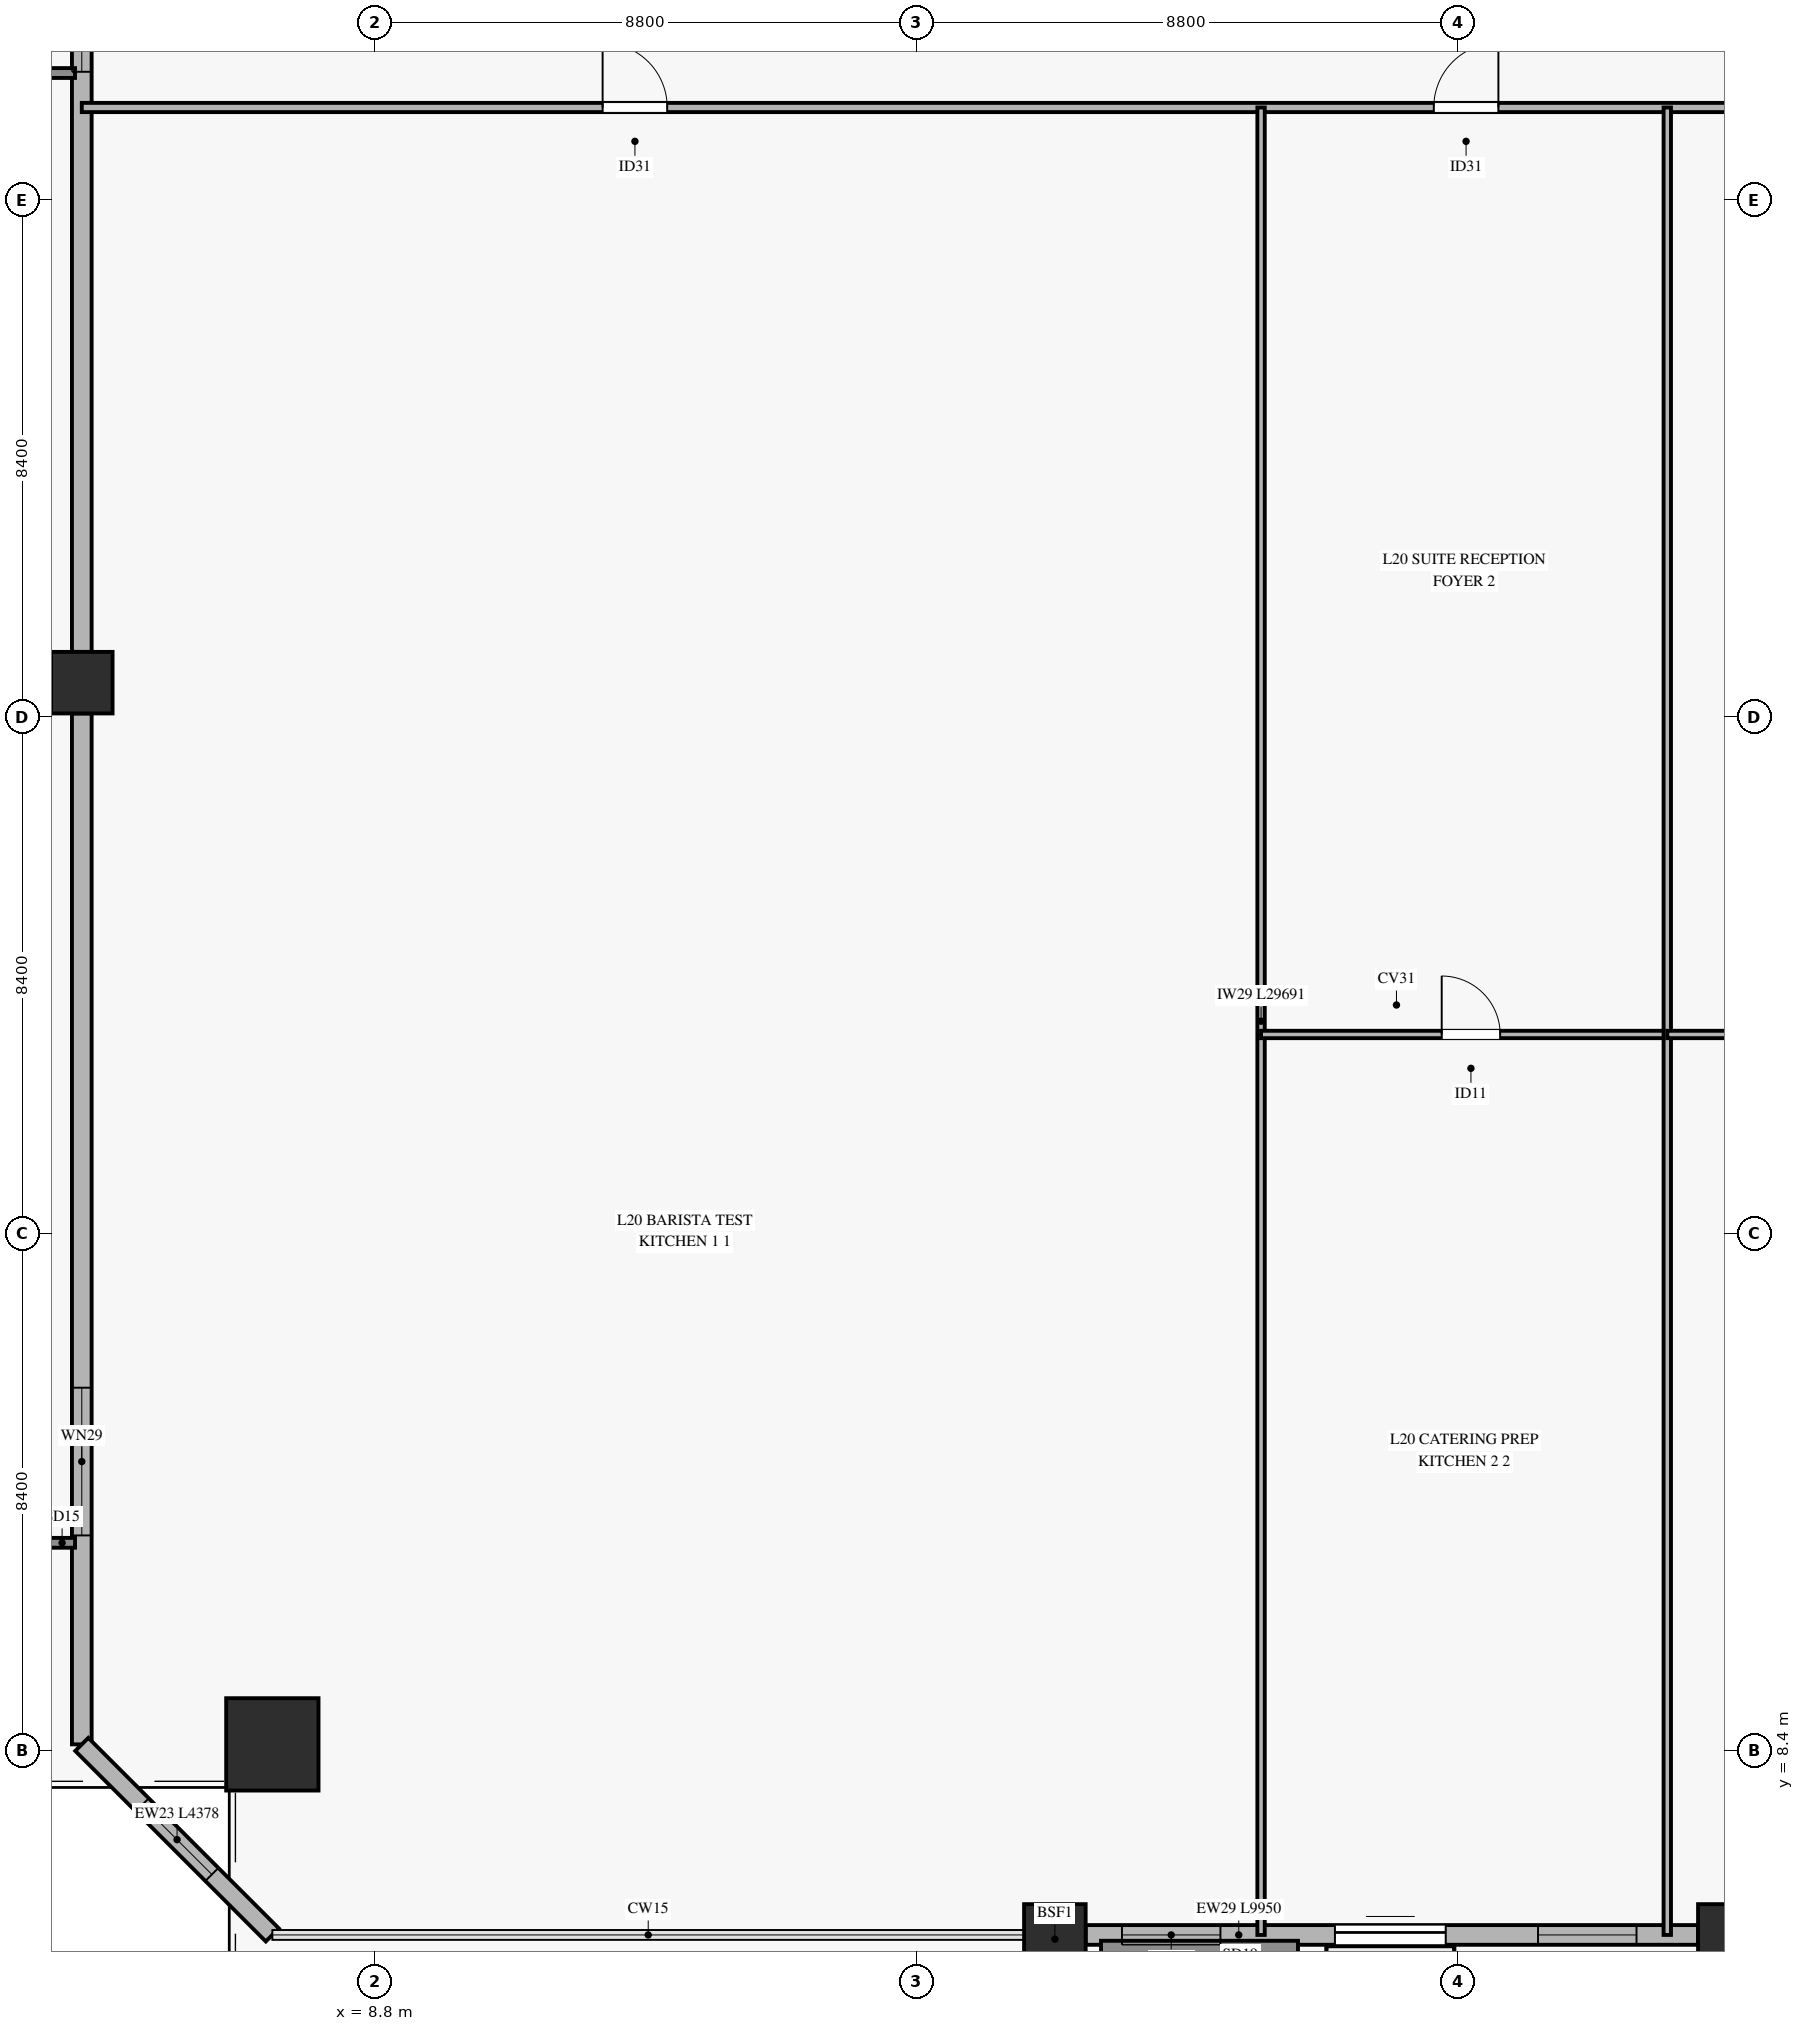
"""IFC4 building model, lengths in metres.
Left out: names, types, materials, properties, quantities, classifications, styles, units other than length and angle.
Written with IfcOpenShell. Run it as: python <this file> out.ifc"""

import sys

from ifc_helpers import new_model, si_unit, direction, frame, frame_2d, origin, origin_2d, place, context, subcontext, project, spatial, rectangle, hollow_rectangle, extrude, source, transform, mapped, element, fill, save


model = new_model("IFC4")
c1 = context("Model", 3, precision=1e-05, world=origin(), true_north=direction((0.0, 1.0)))
c2 = subcontext(c1, "Body", "Model", "MODEL_VIEW")
j1 = project(units=[si_unit("LENGTHUNIT", "METRE"), si_unit("PLANEANGLEUNIT", "RADIAN")], contexts=[c1])
p1 = place(None, origin())
s1 = spatial("IfcSite", under=j1, at=p1, CompositionType="ELEMENT")
p2 = place(p1, origin())
s2 = spatial("IfcBuilding", under=s1, at=p2, CompositionType="ELEMENT")
p3 = place(p2, frame((0.0, 0.0, 83.5)))
s3 = spatial("IfcBuildingStorey", under=s2, at=p3, CompositionType="ELEMENT", Elevation=83.5)
m1 = source(origin(), c2, "Body", "SweptSolid", [
    extrude(hollow_rectangle(XDim=1.5, YDim=1.5, WallThickness=0.07, at=origin_2d()), origin(), (0.0, 0.0, 1.0), 3.72),
])
p4 = place(p3, frame((7.136, 8.505, 0.0), z_axis=(0.056181856516, 0.134744569424, 0.989286358952), x_axis=(-0.922983788144, 0.38483883227, 0.0)))
e1 = element("IfcColumn", 1, at=p4, inside=s3, PredefinedType="COLUMN", context=c2, shape_type="MappedRepresentation", body=[
    mapped(m1, transform((0.0, 0.0, 0.0), x_axis=(1.0, 0.0, 0.0), y_axis=(0.0, 1.0, 0.0), z_axis=(0.0, 0.0, 1.0), scale=1.0)),
])
m2 = source(origin(), c2, "Body", "SweptSolid", [
    extrude(hollow_rectangle(XDim=1.0, YDim=1.0, WallThickness=0.045, at=origin_2d()), origin(), (0.0, 0.0, 1.0), 3.718),
])
for number, where, z_axis, x_axis in (
    (2, (19.85, 5.409, 0.0), (0.0, 0.142, 0.99), (-1.0, 0.0, 0.0)),
    (3, (30.8, 5.409, 0.0), (0.0, 0.142, 0.99), (-1.0, 0.0, 0.0)),
):
    element("IfcColumn", number, at=place(p3, frame(where, z_axis=z_axis, x_axis=x_axis)), inside=s3, PredefinedType="COLUMN", context=c2, shape_type="MappedRepresentation", body=[
        mapped(m2, transform((0.0, 0.0, 0.0), x_axis=(1.0, 0.0, 0.0), y_axis=(0.0, 1.0, 0.0), z_axis=(0.0, 0.0, 1.0), scale=1.0)),
    ])
m3 = source(origin(), c2, "Body", "SweptSolid", [
    extrude(hollow_rectangle(XDim=1.0, YDim=1.0, WallThickness=0.045, at=origin_2d()), origin(), (0.0, 0.0, 1.0), 3.697),
])
p5 = place(p3, frame((4.04, 25.755, 0.0), z_axis=(0.06353152493, 0.07119229093, 0.995437292376), x_axis=(-0.74610956251, 0.665823190292, 0.0)))
e4 = element("IfcColumn", 4, at=p5, inside=s3, PredefinedType="COLUMN", context=c2, shape_type="MappedRepresentation", body=[
    mapped(m3, transform((0.0, 0.0, 0.0), x_axis=(1.0, 0.0, 0.0), y_axis=(0.0, 1.0, 0.0), z_axis=(0.0, 0.0, 1.0), scale=1.0)),
])
p6 = place(p3, frame((20.35, 5.409, 0.0), z_axis=(0.0, 0.0, 1.0), x_axis=(1.0, 0.0, 0.0)))
e5 = element("IfcWall", 5, at=p6, inside=s3, PredefinedType="SOLIDWALL", context=c2, shape_type="SweptSolid", body=[
    extrude(rectangle(XDim=9.95, YDim=0.32, at=frame_2d((4.975, 0.0))), origin(), (0.0, 0.0, 1.0), 3.16),
])
p7 = place(p6, frame((4.05, 0.0, 0.0)))
e6 = element("IfcOpeningElement", 6, at=p7, cuts=e5, PredefinedType="OPENING", context=c2, shape_type="SweptSolid", body=[
    extrude(rectangle(XDim=1.8, YDim=2.25, at=frame_2d((0.9, 1.125))), frame((0.0, 0.17, 0.0), z_axis=(0.0, -1.0, 0.0), x_axis=(1.0, 0.0, 0.0)), (0.0, 0.0, 1.0), 0.34),
])
p8 = place(p6, frame((0.59, 0.0, 0.45)))
e7 = element("IfcOpeningElement", 7, at=p8, cuts=e5, PredefinedType="OPENING", context=c2, shape_type="SweptSolid", body=[
    extrude(rectangle(XDim=1.6, YDim=2.0, at=frame_2d((0.8, 1.0))), frame((0.0, 0.17, 0.0), z_axis=(0.0, -1.0, 0.0), x_axis=(1.0, 0.0, 0.0)), (0.0, 0.0, 1.0), 0.34),
])
p9 = place(p6, frame((7.35, 0.0, 0.45)))
e8 = element("IfcOpeningElement", 8, at=p9, cuts=e5, PredefinedType="OPENING", context=c2, shape_type="SweptSolid", body=[
    extrude(rectangle(XDim=1.6, YDim=2.0, at=frame_2d((0.8, 1.0))), frame((0.0, 0.17, 0.0), z_axis=(0.0, -1.0, 0.0), x_axis=(1.0, 0.0, 0.0)), (0.0, 0.0, 1.0), 0.34),
])
p10 = place(p3, frame((4.04, 8.505, 0.0), z_axis=(0.0, 0.0, 1.0), x_axis=(0.0, 1.0, 0.0)))
e9 = element("IfcWall", 9, at=p10, inside=s3, PredefinedType="SOLIDWALL", context=c2, shape_type="SweptSolid", body=[
    extrude(rectangle(XDim=16.75, YDim=0.32, at=frame_2d((8.375, 0.0))), origin(), (0.0, 0.0, 1.0), 3.16),
])
p11 = place(p10, frame((3.395, 0.0, 0.45)))
e10 = element("IfcOpeningElement", 10, at=p11, cuts=e9, PredefinedType="OPENING", context=c2, shape_type="SweptSolid", body=[
    extrude(rectangle(XDim=2.4, YDim=2.1, at=frame_2d((1.2, 1.05))), frame((0.0, 0.17, 0.0), z_axis=(0.0, -1.0, 0.0), x_axis=(1.0, 0.0, 0.0)), (0.0, 0.0, 1.0), 0.34),
])
p12 = place(p3, frame((4.04, 26.255, 0.0), z_axis=(0.0, 0.0, 1.0), x_axis=(0.0, 1.0, 0.0)))
e11 = element("IfcWall", 11, at=p12, inside=s3, PredefinedType="SOLIDWALL", context=c2, shape_type="SweptSolid", body=[
    extrude(rectangle(XDim=16.749, YDim=0.32, at=frame_2d((8.375, 0.0))), origin(), (0.0, 0.0, 1.0), 3.16),
])
p13 = place(p12, frame((9.425, 0.0, 0.45)))
e12 = element("IfcOpeningElement", 12, at=p13, cuts=e11, PredefinedType="OPENING", context=c2, shape_type="SweptSolid", body=[
    extrude(rectangle(XDim=1.2, YDim=2.0, at=frame_2d((0.6, 1.0))), frame((0.0, 0.17, 0.0), z_axis=(0.0, -1.0, 0.0), x_axis=(1.0, 0.0, 0.0)), (0.0, 0.0, 1.0), 0.34),
])
p14 = place(p3, frame((4.04, 8.505, 0.0), z_axis=(0.0, 0.0, 1.0), x_axis=(0.707106781187, -0.707106781187, 0.0)))
e13 = element("IfcWall", 13, at=p14, inside=s3, PredefinedType="SOLIDWALL", context=c2, shape_type="SweptSolid", body=[
    extrude(rectangle(XDim=4.378, YDim=0.3, at=frame_2d((2.189, 0.0))), origin(), (0.0, 0.0, 1.0), 3.16),
])
p15 = place(p14, frame((1.389, 0.0, 0.45)))
e14 = element("IfcOpeningElement", 14, at=p15, cuts=e13, PredefinedType="OPENING", context=c2, shape_type="SweptSolid", body=[
    extrude(rectangle(XDim=1.6, YDim=2.0, at=frame_2d((0.8, 1.0))), frame((0.0, 0.16, 0.0), z_axis=(0.0, -1.0, 0.0), x_axis=(1.0, 0.0, 0.0)), (0.0, 0.0, 1.0), 0.32),
])
p16 = place(p3, frame((4.04, 35.1, 0.0), z_axis=(0.0, 0.0, 1.0), x_axis=(1.0, 0.0, 0.0)))
e15 = element("IfcWall", 15, at=p16, inside=s3, PredefinedType="PARTITIONING", context=c2, shape_type="SweptSolid", body=[
    extrude(rectangle(XDim=62.321, YDim=0.15, at=frame_2d((31.161, 0.0))), origin(), (0.0, 0.0, 1.0), 2.765),
])
p17 = place(p16, frame((8.462, 0.0, 0.0)))
e16 = element("IfcOpeningElement", 16, at=p17, cuts=e15, PredefinedType="OPENING", context=c2, shape_type="SweptSolid", body=[
    extrude(rectangle(XDim=1.05, YDim=2.15, at=frame_2d((0.525, 1.075))), frame((0.0, 0.085, 0.0), z_axis=(0.0, -1.0, 0.0), x_axis=(1.0, 0.0, 0.0)), (0.0, 0.0, 1.0), 0.17),
])
p18 = place(p16, frame((21.966, 0.0, 0.0)))
e17 = element("IfcOpeningElement", 17, at=p18, cuts=e15, PredefinedType="OPENING", context=c2, shape_type="SweptSolid", body=[
    extrude(rectangle(XDim=1.05, YDim=2.15, at=frame_2d((0.525, 1.075))), frame((0.0, 0.085, 0.0), z_axis=(0.0, -1.0, 0.0), x_axis=(1.0, 0.0, 0.0)), (0.0, 0.0, 1.0), 0.17),
])
p19 = place(p16, frame((28.646, 0.0, 0.0)))
e18 = element("IfcOpeningElement", 18, at=p19, cuts=e15, PredefinedType="OPENING", context=c2, shape_type="SweptSolid", body=[
    extrude(rectangle(XDim=1.05, YDim=2.15, at=frame_2d((0.525, 1.075))), frame((0.0, 0.085, 0.0), z_axis=(0.0, -1.0, 0.0), x_axis=(1.0, 0.0, 0.0)), (0.0, 0.0, 1.0), 0.17),
])
p20 = place(p16, frame((35.606, 0.0, 0.0)))
e19 = element("IfcOpeningElement", 19, at=p20, cuts=e15, PredefinedType="OPENING", context=c2, shape_type="SweptSolid", body=[
    extrude(rectangle(XDim=1.05, YDim=2.15, at=frame_2d((0.525, 1.075))), frame((0.0, 0.085, 0.0), z_axis=(0.0, -1.0, 0.0), x_axis=(1.0, 0.0, 0.0)), (0.0, 0.0, 1.0), 0.17),
])
p21 = place(p16, frame((49.216, 0.0, 0.0)))
e20 = element("IfcOpeningElement", 20, at=p21, cuts=e15, PredefinedType="OPENING", context=c2, shape_type="SweptSolid", body=[
    extrude(rectangle(XDim=1.05, YDim=2.15, at=frame_2d((0.525, 1.075))), frame((0.0, 0.085, 0.0), z_axis=(0.0, -1.0, 0.0), x_axis=(1.0, 0.0, 0.0)), (0.0, 0.0, 1.0), 0.17),
])
p22 = place(p3, frame((23.2, 5.409, 0.0), z_axis=(0.0, 0.0, 1.0), x_axis=(0.0, 1.0, 0.0)))
e21 = element("IfcWall", 21, at=p22, inside=s3, PredefinedType="PARTITIONING", context=c2, shape_type="SweptSolid", body=[
    extrude(rectangle(XDim=29.691, YDim=0.12, at=frame_2d((14.846, 0.0))), origin(), (0.0, 0.0, 1.0), 3.165),
])
p23 = place(p3, frame((23.2, 20.039, 0.0), z_axis=(0.0, 0.0, 1.0), x_axis=(1.0, 0.0, 0.0)))
e22 = element("IfcWall", 22, at=p23, inside=s3, PredefinedType="PARTITIONING", context=c2, shape_type="SweptSolid", body=[
    extrude(rectangle(XDim=6.6, YDim=0.12, at=frame_2d((3.3, 0.0))), origin(), (0.0, 0.0, 1.0), 3.68),
])
p24 = place(p23, frame((2.935, 0.0, 0.0)))
e23 = element("IfcOpeningElement", 23, at=p24, cuts=e22, PredefinedType="OPENING", context=c2, shape_type="SweptSolid", body=[
    extrude(rectangle(XDim=0.95, YDim=2.1, at=frame_2d((0.475, 1.05))), frame((0.0, 0.07, 0.0), z_axis=(0.0, -1.0, 0.0), x_axis=(1.0, 0.0, 0.0)), (0.0, 0.0, 1.0), 0.14),
])
p25 = place(p3, frame((29.8, 5.409, 0.0), z_axis=(0.0, 0.0, 1.0), x_axis=(0.0, 1.0, 0.0)))
e24 = element("IfcWall", 24, at=p25, inside=s3, PredefinedType="PARTITIONING", context=c2, shape_type="SweptSolid", body=[
    extrude(rectangle(XDim=29.691, YDim=0.12, at=frame_2d((14.846, 0.0))), origin(), (0.0, 0.0, 1.0), 3.165),
])
p26 = place(p3, frame((29.8, 20.039, 0.0), z_axis=(0.0, 0.0, 1.0), x_axis=(1.0, 0.0, 0.0)))
e25 = element("IfcWall", 25, at=p26, inside=s3, PredefinedType="PARTITIONING", context=c2, shape_type="SweptSolid", body=[
    extrude(rectangle(XDim=6.8, YDim=0.12, at=frame_2d((3.4, 0.0))), origin(), (0.0, 0.0, 1.0), 2.765),
])
p27 = place(p26, frame((3.019, 0.0, 0.0)))
e26 = element("IfcOpeningElement", 26, at=p27, cuts=e25, PredefinedType="OPENING", context=c2, shape_type="SweptSolid", body=[
    extrude(rectangle(XDim=0.95, YDim=2.1, at=frame_2d((0.475, 1.05))), frame((0.0, 0.07, 0.0), z_axis=(0.0, -1.0, 0.0), x_axis=(1.0, 0.0, 0.0)), (0.0, 0.0, 1.0), 0.14),
])
m4 = source(origin(), c2, "Body", "SweptSolid", [
    extrude(rectangle(XDim=1.8, YDim=2.25, at=frame_2d((0.9, 1.125))), frame((0.0, 0.025, 0.0), z_axis=(0.0, -1.0, 0.0), x_axis=(1.0, 0.0, 0.0)), (0.0, 0.0, 1.0), 0.05),
])
p28 = place(p7, origin())
e27 = element("IfcDoor", 27, at=p28, inside=s3, OperationType="SLIDING_TO_LEFT", PredefinedType="DOOR", context=c2, shape_type="MappedRepresentation", body=[
    mapped(m4, transform((0.0, 0.0, 0.0), x_axis=(1.0, 0.0, 0.0), y_axis=(0.0, 1.0, 0.0), z_axis=(0.0, 0.0, 1.0), scale=1.0)),
])
fill(e6, e27)
m5 = source(origin(), c2, "Body", "SweptSolid", [
    extrude(rectangle(XDim=1.6, YDim=2.0, at=frame_2d((0.8, 1.0))), frame((0.0, 0.03, 0.0), z_axis=(0.0, -1.0, 0.0), x_axis=(1.0, 0.0, 0.0)), (0.0, 0.0, 1.0), 0.06),
])
p29 = place(p8, origin())
e28 = element("IfcWindow", 28, at=p29, inside=s3, PartitioningType="SINGLE_PANEL", PredefinedType="WINDOW", context=c2, shape_type="MappedRepresentation", body=[
    mapped(m5, transform((0.0, 0.0, 0.0), x_axis=(1.0, 0.0, 0.0), y_axis=(0.0, 1.0, 0.0), z_axis=(0.0, 0.0, 1.0), scale=1.0)),
])
fill(e7, e28)
p30 = place(p9, origin())
e29 = element("IfcWindow", 29, at=p30, inside=s3, PartitioningType="SINGLE_PANEL", PredefinedType="WINDOW", context=c2, shape_type="MappedRepresentation", body=[
    mapped(m5, transform((0.0, 0.0, 0.0), x_axis=(1.0, 0.0, 0.0), y_axis=(0.0, 1.0, 0.0), z_axis=(0.0, 0.0, 1.0), scale=1.0)),
])
fill(e8, e29)
m6 = source(origin(), c2, "Body", "SweptSolid", [
    extrude(rectangle(XDim=2.4, YDim=2.1, at=frame_2d((1.2, 1.05))), frame((0.0, 0.03, 0.0), z_axis=(0.0, -1.0, 0.0), x_axis=(1.0, 0.0, 0.0)), (0.0, 0.0, 1.0), 0.06),
])
p31 = place(p11, origin())
e30 = element("IfcWindow", 30, at=p31, inside=s3, PartitioningType="SINGLE_PANEL", PredefinedType="WINDOW", context=c2, shape_type="MappedRepresentation", body=[
    mapped(m6, transform((0.0, 0.0, 0.0), x_axis=(1.0, 0.0, 0.0), y_axis=(0.0, 1.0, 0.0), z_axis=(0.0, 0.0, 1.0), scale=1.0)),
])
fill(e10, e30)
m7 = source(origin(), c2, "Body", "SweptSolid", [
    extrude(rectangle(XDim=1.2, YDim=2.0, at=frame_2d((0.6, 1.0))), frame((0.0, 0.03, 0.0), z_axis=(0.0, -1.0, 0.0), x_axis=(1.0, 0.0, 0.0)), (0.0, 0.0, 1.0), 0.06),
])
p32 = place(p13, origin())
e31 = element("IfcWindow", 31, at=p32, inside=s3, PartitioningType="SINGLE_PANEL", PredefinedType="WINDOW", context=c2, shape_type="MappedRepresentation", body=[
    mapped(m7, transform((0.0, 0.0, 0.0), x_axis=(1.0, 0.0, 0.0), y_axis=(0.0, 1.0, 0.0), z_axis=(0.0, 0.0, 1.0), scale=1.0)),
])
fill(e12, e31)
p33 = place(p15, origin())
e32 = element("IfcWindow", 32, at=p33, inside=s3, PartitioningType="SINGLE_PANEL", PredefinedType="WINDOW", context=c2, shape_type="MappedRepresentation", body=[
    mapped(m5, transform((0.0, 0.0, 0.0), x_axis=(1.0, 0.0, 0.0), y_axis=(0.0, 1.0, 0.0), z_axis=(0.0, 0.0, 1.0), scale=1.0)),
])
fill(e14, e32)
m8 = source(origin(), c2, "Body", "SweptSolid", [
    extrude(rectangle(XDim=1.05, YDim=2.15, at=frame_2d((0.525, 1.075))), frame((0.0, 0.025, 0.0), z_axis=(0.0, -1.0, 0.0), x_axis=(1.0, 0.0, 0.0)), (0.0, 0.0, 1.0), 0.05),
])
p34 = place(p17, origin())
e33 = element("IfcDoor", 33, at=p34, inside=s3, OperationType="SINGLE_SWING_LEFT", PredefinedType="DOOR", context=c2, shape_type="MappedRepresentation", body=[
    mapped(m8, transform((0.0, 0.0, 0.0), x_axis=(1.0, 0.0, 0.0), y_axis=(0.0, 1.0, 0.0), z_axis=(0.0, 0.0, 1.0), scale=1.0)),
])
fill(e16, e33)
p35 = place(p18, origin())
e34 = element("IfcDoor", 34, at=p35, inside=s3, OperationType="SINGLE_SWING_RIGHT", PredefinedType="DOOR", context=c2, shape_type="MappedRepresentation", body=[
    mapped(m8, transform((0.0, 0.0, 0.0), x_axis=(1.0, 0.0, 0.0), y_axis=(0.0, 1.0, 0.0), z_axis=(0.0, 0.0, 1.0), scale=1.0)),
])
fill(e17, e34)
m9 = source(origin(), c2, "Body", "SweptSolid", [
    extrude(rectangle(XDim=0.95, YDim=2.1, at=frame_2d((0.475, 1.05))), frame((0.0, 0.025, 0.0), z_axis=(0.0, -1.0, 0.0), x_axis=(1.0, 0.0, 0.0)), (0.0, 0.0, 1.0), 0.05),
])
p36 = place(p24, origin())
e35 = element("IfcDoor", 35, at=p36, inside=s3, OperationType="SINGLE_SWING_LEFT", PredefinedType="DOOR", context=c2, shape_type="MappedRepresentation", body=[
    mapped(m9, transform((0.0, 0.0, 0.0), x_axis=(1.0, 0.0, 0.0), y_axis=(0.0, 1.0, 0.0), z_axis=(0.0, 0.0, 1.0), scale=1.0)),
])
fill(e23, e35)
save(model, sys.argv[1])
